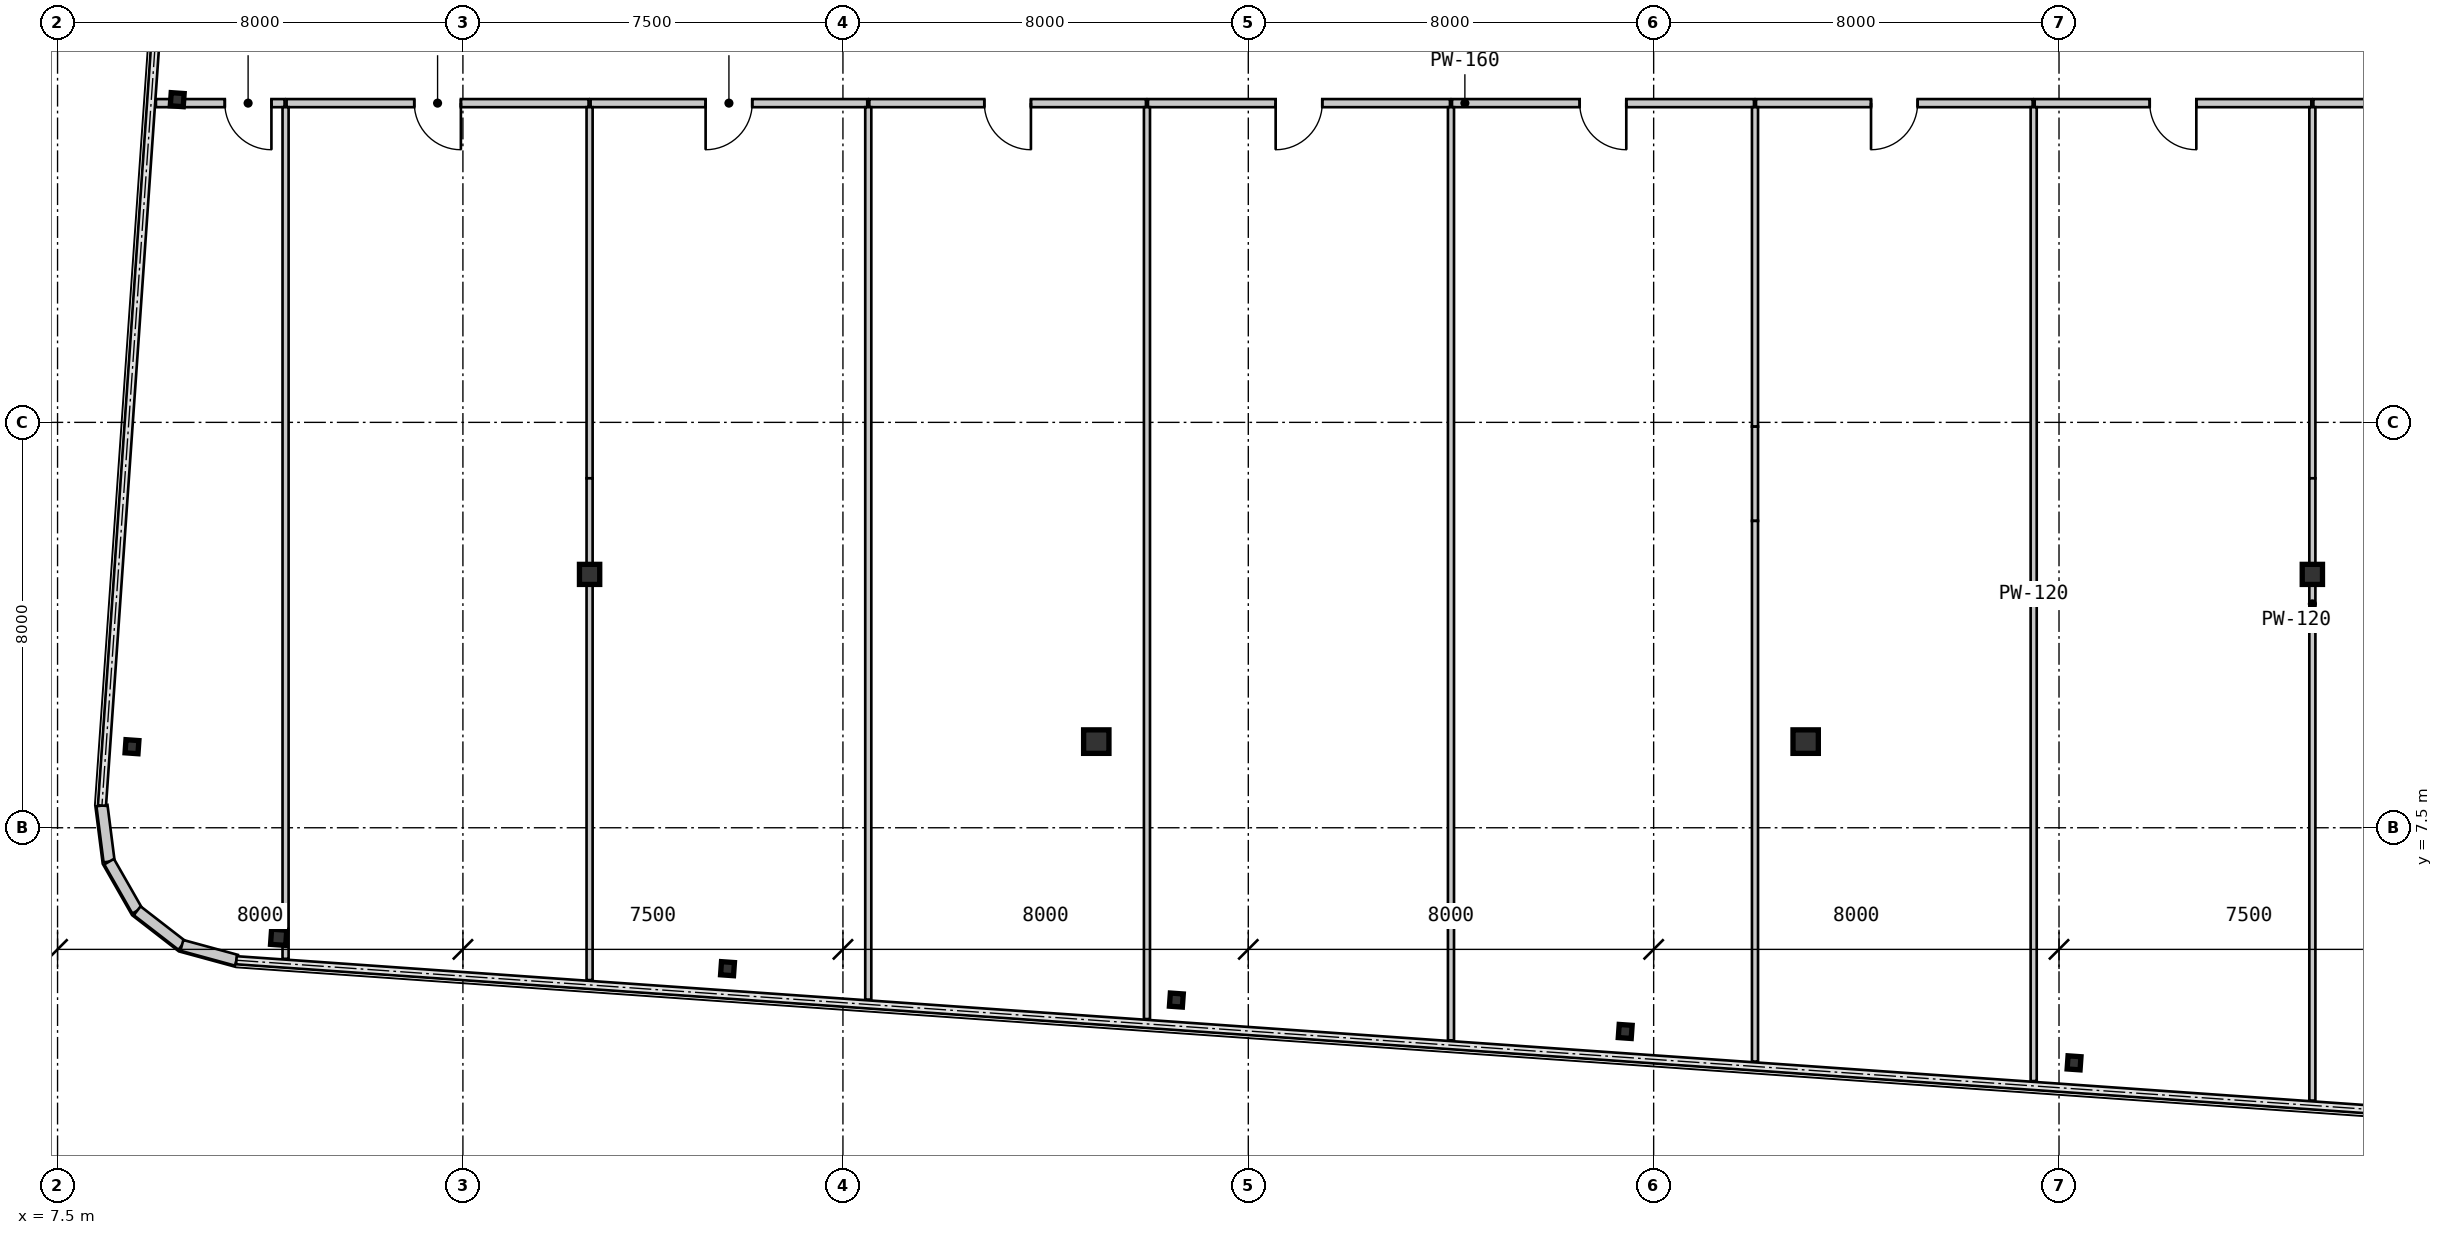
"""IFC4 building model, lengths in metres.
Left out: names, types, materials, properties, quantities, classifications, styles, units other than length and angle.
Written with IfcOpenShell. Run it as: python <this file> out.ifc"""

import sys

from ifc_helpers import new_model, si_unit, direction, frame, frame_2d, origin, origin_2d, place, context, subcontext, project, spatial, rectangle, hollow_rectangle, i_section, extrude, source, transform, mapped, element, fill, save


model = new_model("IFC4")
c1 = context("Model", 3, precision=1e-05, world=origin(), true_north=direction((0.0, 1.0)))
c2 = subcontext(c1, "Body", "Model", "MODEL_VIEW")
j1 = project(units=[si_unit("LENGTHUNIT", "METRE"), si_unit("PLANEANGLEUNIT", "RADIAN")], contexts=[c1])
p1 = place(None, origin())
s1 = spatial("IfcSite", under=j1, at=p1, CompositionType="ELEMENT")
p2 = place(p1, origin())
s2 = spatial("IfcBuilding", under=s1, at=p2, CompositionType="ELEMENT")
p3 = place(p2, frame((0.0, 0.0, 120.4)))
s3 = spatial("IfcBuildingStorey", under=s2, at=p3, CompositionType="ELEMENT", Elevation=120.4)
m1 = source(origin(), c2, "Body", "SweptSolid", [
    extrude(i_section(OverallWidth=0.5, OverallDepth=0.464, WebThickness=0.022, FlangeThickness=0.034, at=origin_2d()), origin(), (0.0, 0.0, 1.0), 3.15),
])
for number, where, z_axis, x_axis in (
    (1, (28.0, 9.2, 0.0), (0.0, 0.0, 1.0), (1.0, 0.0, 0.0)),
    (2, (42.0, 9.2, 0.0), (0.0, 0.0, 1.0), (1.0, 0.0, 0.0)),
):
    element("IfcColumn", number, at=place(p3, frame(where, z_axis=z_axis, x_axis=x_axis)), inside=s3, PredefinedType="COLUMN", context=c2, shape_type="MappedRepresentation", body=[
        mapped(m1, transform((0.0, 0.0, 0.0), scale=1.0)),
    ])
m2 = source(origin(), c2, "Body", "SweptSolid", [
    extrude(i_section(OverallWidth=0.4, OverallDepth=0.396, WebThickness=0.022, FlangeThickness=0.034, at=origin_2d()), origin(), (0.0, 0.0, 1.0), 3.15),
])
for number, where, z_axis, x_axis in (
    (3, (18.0, 12.5, 0.0), (0.0, 0.0, 1.0), (1.0, 0.0, 0.0)),
    (4, (52.0, 12.5, 0.0), (0.0, 0.0, 1.0), (1.0, 0.0, 0.0)),
):
    element("IfcColumn", number, at=place(p3, frame(where, z_axis=z_axis, x_axis=x_axis)), inside=s3, PredefinedType="COLUMN", context=c2, shape_type="MappedRepresentation", body=[
        mapped(m2, transform((0.0, 0.0, 0.0), scale=1.0)),
    ])
m3 = source(origin(), c2, "Body", "SweptSolid", [
    extrude(hollow_rectangle(XDim=0.3, YDim=0.3, WallThickness=0.012, at=origin_2d()), origin(), (0.0, 0.0, 1.0), 3.15),
])
p4 = place(p3, frame((11.864, 5.338, 0.0), z_axis=(0.0, 0.0, 1.0), x_axis=(0.99756405026, -0.069756473744, 0.0)))
e5 = element("IfcColumn", 5, at=p4, inside=s3, PredefinedType="COLUMN", context=c2, shape_type="MappedRepresentation", body=[
    mapped(m3, transform((0.0, 0.0, 0.0), scale=1.0)),
])
m4 = source(origin(), c2, "Body", "SweptSolid", [
    extrude(i_section(OverallWidth=0.256, OverallDepth=0.26, WebThickness=0.01, FlangeThickness=0.017, at=origin_2d()), origin(), (0.0, 0.0, 1.0), 3.15),
])
for number, where, z_axis, x_axis in (
    (6, (20.722, 4.719, 0.0), (0.0, 0.0, 1.0), (0.998, -0.07, 0.0)),
    (7, (29.58, 4.1, 0.0), (0.0, 0.0, 1.0), (0.998, -0.07, 0.0)),
    (8, (38.439, 3.48, 0.0), (0.0, 0.0, 1.0), (0.998, -0.07, 0.0)),
    (9, (47.297, 2.861, 0.0), (0.0, 0.0, 1.0), (0.998, -0.07, 0.0)),
    (10, (8.969, 9.1, 0.0), (0.0, 0.0, 1.0), (0.998, -0.07, 0.0)),
    (11, (9.862, 21.868, 0.0), (0.0, 0.0, 1.0), (0.998, -0.07, 0.0)),
):
    element("IfcColumn", number, at=place(p3, frame(where, z_axis=z_axis, x_axis=x_axis)), inside=s3, PredefinedType="COLUMN", context=c2, shape_type="MappedRepresentation", body=[
        mapped(m4, transform((0.0, 0.0, 0.0), scale=1.0)),
    ])
m5 = source(origin(), c2, "Body", "SweptSolid", [
    extrude(rectangle(XDim=1.116, YDim=0.22, at=frame_2d((0.558, 0.0))), origin(), (0.0, 0.0, 1.0), 2.93),
])
for number, where, z_axis, x_axis in (
    (12, (8.376, 7.938, 0.0), (0.0, 0.0, 1.0), (0.126, -0.992, 0.0)),
    (13, (8.517, 6.831, 0.0), (0.0, 0.0, 1.0), (0.496, -0.868, 0.0)),
    (14, (9.071, 5.862, 0.0), (0.0, 0.0, 1.0), (0.791, -0.612, 0.0)),
    (15, (9.953, 5.179, 0.0), (0.0, 0.0, 1.0), (0.965, -0.263, 0.0)),
):
    element("IfcWall", number, at=place(p3, frame(where, z_axis=z_axis, x_axis=x_axis)), inside=s3, PredefinedType="SOLIDWALL", context=c2, shape_type="MappedRepresentation", body=[
        mapped(m5, transform((0.0, 0.0, 0.0), scale=1.0)),
    ])
m6 = source(origin(), c2, "Body", "SweptSolid", [
    extrude(rectangle(XDim=2.538, YDim=0.16, at=frame_2d((1.269, 0.0))), origin(), (0.0, 0.0, 1.0), 2.93),
])
p5 = place(p3, frame((11.98, 21.8, 0.0), z_axis=(0.0, 0.0, 1.0), x_axis=(-1.0, 0.0, 0.0)))
e16 = element("IfcWall", 16, at=p5, inside=s3, PredefinedType="PARTITIONING", context=c2, shape_type="MappedRepresentation", body=[
    mapped(m6, transform((0.0, 0.0, 0.0), scale=1.0)),
])
m7 = source(origin(), c2, "Body", "SweptSolid", [
    extrude(rectangle(XDim=0.92, YDim=2.1, at=frame_2d((0.46, 1.05))), frame((0.0, 0.09, 0.0), z_axis=(0.0, -1.0, 0.0), x_axis=(1.0, 0.0, 0.0)), (0.0, 0.0, 1.0), 0.18),
])
p6 = place(p5, frame((0.259, 0.0, 0.0)))
e17 = element("IfcOpeningElement", 17, at=p6, cuts=e16, PredefinedType="OPENING", context=c2, shape_type="MappedRepresentation", body=[
    mapped(m7, transform((0.0, 0.0, 0.0), scale=1.0)),
])
m8 = source(origin(), c2, "Body", "SweptSolid", [
    extrude(rectangle(XDim=5.959, YDim=0.16, at=frame_2d((2.98, 0.0))), origin(), (0.0, 0.0, 1.0), 2.93),
])
p7 = place(p3, frame((17.98, 21.8, 0.0), z_axis=(0.0, 0.0, 1.0), x_axis=(-1.0, 0.0, 0.0)))
e18 = element("IfcWall", 18, at=p7, inside=s3, PredefinedType="PARTITIONING", context=c2, shape_type="MappedRepresentation", body=[
    mapped(m8, transform((0.0, 0.0, 0.0), scale=1.0)),
])
p8 = place(p7, frame((2.52, 0.0, 0.0)))
e19 = element("IfcOpeningElement", 19, at=p8, cuts=e18, PredefinedType="OPENING", context=c2, shape_type="MappedRepresentation", body=[
    mapped(m7, transform((0.0, 0.0, 0.0), scale=1.0)),
])
m9 = source(origin(), c2, "Body", "SweptSolid", [
    extrude(rectangle(XDim=5.459, YDim=0.16, at=frame_2d((2.73, 0.0))), origin(), (0.0, 0.0, 1.0), 2.93),
])
p9 = place(p3, frame((23.48, 21.8, 0.0), z_axis=(0.0, 0.0, 1.0), x_axis=(-1.0, 0.0, 0.0)))
e20 = element("IfcWall", 20, at=p9, inside=s3, PredefinedType="PARTITIONING", context=c2, shape_type="MappedRepresentation", body=[
    mapped(m9, transform((0.0, 0.0, 0.0), scale=1.0)),
])
p10 = place(p9, frame((2.27, 0.0, 0.0)))
e21 = element("IfcOpeningElement", 21, at=p10, cuts=e20, PredefinedType="OPENING", context=c2, shape_type="MappedRepresentation", body=[
    mapped(m7, transform((0.0, 0.0, 0.0), scale=1.0)),
])
p11 = place(p3, frame((28.98, 21.8, 0.0), z_axis=(0.0, 0.0, 1.0), x_axis=(-1.0, 0.0, 0.0)))
e22 = element("IfcWall", 22, at=p11, inside=s3, PredefinedType="PARTITIONING", context=c2, shape_type="MappedRepresentation", body=[
    mapped(m9, transform((0.0, 0.0, 0.0), scale=1.0)),
])
p12 = place(p11, frame((2.27, 0.0, 0.0)))
e23 = element("IfcOpeningElement", 23, at=p12, cuts=e22, PredefinedType="OPENING", context=c2, shape_type="MappedRepresentation", body=[
    mapped(m7, transform((0.0, 0.0, 0.0), scale=1.0)),
])
p13 = place(p3, frame((34.98, 21.8, 0.0), z_axis=(0.0, 0.0, 1.0), x_axis=(-1.0, 0.0, 0.0)))
e24 = element("IfcWall", 24, at=p13, inside=s3, PredefinedType="PARTITIONING", context=c2, shape_type="MappedRepresentation", body=[
    mapped(m8, transform((0.0, 0.0, 0.0), scale=1.0)),
])
p14 = place(p13, frame((2.52, 0.0, 0.0)))
e25 = element("IfcOpeningElement", 25, at=p14, cuts=e24, PredefinedType="OPENING", context=c2, shape_type="MappedRepresentation", body=[
    mapped(m7, transform((0.0, 0.0, 0.0), scale=1.0)),
])
p15 = place(p3, frame((40.98, 21.8, 0.0), z_axis=(0.0, 0.0, 1.0), x_axis=(-1.0, 0.0, 0.0)))
e26 = element("IfcWall", 26, at=p15, inside=s3, PredefinedType="PARTITIONING", context=c2, shape_type="MappedRepresentation", body=[
    mapped(m8, transform((0.0, 0.0, 0.0), scale=1.0)),
])
p16 = place(p15, frame((2.52, 0.0, 0.0)))
e27 = element("IfcOpeningElement", 27, at=p16, cuts=e26, PredefinedType="OPENING", context=c2, shape_type="MappedRepresentation", body=[
    mapped(m7, transform((0.0, 0.0, 0.0), scale=1.0)),
])
p17 = place(p3, frame((46.48, 21.8, 0.0), z_axis=(0.0, 0.0, 1.0), x_axis=(-1.0, 0.0, 0.0)))
e28 = element("IfcWall", 28, at=p17, inside=s3, PredefinedType="PARTITIONING", context=c2, shape_type="MappedRepresentation", body=[
    mapped(m9, transform((0.0, 0.0, 0.0), scale=1.0)),
])
p18 = place(p17, frame((2.27, 0.0, 0.0)))
e29 = element("IfcOpeningElement", 29, at=p18, cuts=e28, PredefinedType="OPENING", context=c2, shape_type="MappedRepresentation", body=[
    mapped(m7, transform((0.0, 0.0, 0.0), scale=1.0)),
])
p19 = place(p3, frame((51.98, 21.8, 0.0), z_axis=(0.0, 0.0, 1.0), x_axis=(-1.0, 0.0, 0.0)))
e30 = element("IfcWall", 30, at=p19, inside=s3, PredefinedType="PARTITIONING", context=c2, shape_type="MappedRepresentation", body=[
    mapped(m9, transform((0.0, 0.0, 0.0), scale=1.0)),
])
p20 = place(p19, frame((2.27, 0.0, 0.0)))
e31 = element("IfcOpeningElement", 31, at=p20, cuts=e30, PredefinedType="OPENING", context=c2, shape_type="MappedRepresentation", body=[
    mapped(m7, transform((0.0, 0.0, 0.0), scale=1.0)),
])
p21 = place(p3, frame((57.98, 21.8, 0.0), z_axis=(0.0, 0.0, 1.0), x_axis=(-1.0, 0.0, 0.0)))
e32 = element("IfcWall", 32, at=p21, inside=s3, PredefinedType="PARTITIONING", context=c2, shape_type="MappedRepresentation", body=[
    mapped(m8, transform((0.0, 0.0, 0.0), scale=1.0)),
])
p22 = place(p21, frame((2.52, 0.0, 0.0)))
e33 = element("IfcOpeningElement", 33, at=p22, cuts=e32, PredefinedType="OPENING", context=c2, shape_type="MappedRepresentation", body=[
    mapped(m7, transform((0.0, 0.0, 0.0), scale=1.0)),
])
m10 = source(origin(), c2, "Body", "SweptSolid", [
    extrude(rectangle(XDim=16.807, YDim=0.12, at=frame_2d((8.403, 0.0))), origin(), (0.0, 0.0, 1.0), 2.93),
])
p23 = place(p3, frame((12.0, 21.72, 0.0), z_axis=(0.0, 0.0, 1.0), x_axis=(0.0, -1.0, 0.0)))
e34 = element("IfcWall", 34, at=p23, inside=s3, PredefinedType="PARTITIONING", context=c2, shape_type="MappedRepresentation", body=[
    mapped(m10, transform((0.0, 0.0, 0.0), scale=1.0)),
])
m11 = source(origin(), c2, "Body", "SweptSolid", [
    extrude(rectangle(XDim=7.324, YDim=0.12, at=frame_2d((3.662, 0.0))), origin(), (0.0, 0.0, 1.0), 2.93),
])
p24 = place(p3, frame((18.0, 21.72, 0.0), z_axis=(0.0, 0.0, 1.0), x_axis=(0.0, -1.0, 0.0)))
e35 = element("IfcWall", 35, at=p24, inside=s3, PredefinedType="PARTITIONING", context=c2, shape_type="MappedRepresentation", body=[
    mapped(m11, transform((0.0, 0.0, 0.0), scale=1.0)),
])
m12 = source(origin(), c2, "Body", "SweptSolid", [
    extrude(rectangle(XDim=1.901, YDim=0.12, at=frame_2d((0.951, 0.0))), origin(), (0.0, 0.0, 1.0), 2.397),
])
p25 = place(p3, frame((18.0, 14.396, 0.0), z_axis=(0.0, 0.0, 1.0), x_axis=(0.0, -1.0, 0.0)))
e36 = element("IfcWall", 36, at=p25, inside=s3, PredefinedType="PARTITIONING", context=c2, shape_type="MappedRepresentation", body=[
    mapped(m12, transform((0.0, 0.0, 0.0), scale=1.0)),
])
m13 = source(origin(), c2, "Body", "SweptSolid", [
    extrude(rectangle(XDim=8.001, YDim=0.12, at=frame_2d((4.0, 0.0))), origin(), (0.0, 0.0, 1.0), 2.93),
])
p26 = place(p3, frame((18.0, 12.495, 0.0), z_axis=(0.0, 0.0, 1.0), x_axis=(0.0, -1.0, 0.0)))
e37 = element("IfcWall", 37, at=p26, inside=s3, PredefinedType="PARTITIONING", context=c2, shape_type="MappedRepresentation", body=[
    mapped(m13, transform((0.0, 0.0, 0.0), scale=1.0)),
])
m14 = source(origin(), c2, "Body", "SweptSolid", [
    extrude(rectangle(XDim=17.611, YDim=0.12, at=frame_2d((8.805, 0.0))), origin(), (0.0, 0.0, 1.0), 2.93),
])
p27 = place(p3, frame((23.5, 21.72, 0.0), z_axis=(0.0, 0.0, 1.0), x_axis=(0.0, -1.0, 0.0)))
e38 = element("IfcWall", 38, at=p27, inside=s3, PredefinedType="PARTITIONING", context=c2, shape_type="MappedRepresentation", body=[
    mapped(m14, transform((0.0, 0.0, 0.0), scale=1.0)),
])
m15 = source(origin(), c2, "Body", "SweptSolid", [
    extrude(rectangle(XDim=17.995, YDim=0.12, at=frame_2d((8.998, 0.0))), origin(), (0.0, 0.0, 1.0), 2.93),
])
p28 = place(p3, frame((29.0, 21.72, 0.0), z_axis=(0.0, 0.0, 1.0), x_axis=(0.0, -1.0, 0.0)))
e39 = element("IfcWall", 39, at=p28, inside=s3, PredefinedType="PARTITIONING", context=c2, shape_type="MappedRepresentation", body=[
    mapped(m15, transform((0.0, 0.0, 0.0), scale=1.0)),
])
m16 = source(origin(), c2, "Body", "SweptSolid", [
    extrude(rectangle(XDim=18.415, YDim=0.12, at=frame_2d((9.208, 0.0))), origin(), (0.0, 0.0, 1.0), 2.93),
])
p29 = place(p3, frame((35.0, 21.72, 0.0), z_axis=(0.0, 0.0, 1.0), x_axis=(0.0, -1.0, 0.0)))
e40 = element("IfcWall", 40, at=p29, inside=s3, PredefinedType="PARTITIONING", context=c2, shape_type="MappedRepresentation", body=[
    mapped(m16, transform((0.0, 0.0, 0.0), scale=1.0)),
])
m17 = source(origin(), c2, "Body", "SweptSolid", [
    extrude(rectangle(XDim=6.304, YDim=0.12, at=frame_2d((3.152, 0.0))), origin(), (0.0, 0.0, 1.0), 2.93),
])
p30 = place(p3, frame((41.0, 21.72, 0.0), z_axis=(0.0, 0.0, 1.0), x_axis=(0.0, -1.0, 0.0)))
e41 = element("IfcWall", 41, at=p30, inside=s3, PredefinedType="PARTITIONING", context=c2, shape_type="MappedRepresentation", body=[
    mapped(m17, transform((0.0, 0.0, 0.0), scale=1.0)),
])
m18 = source(origin(), c2, "Body", "SweptSolid", [
    extrude(rectangle(XDim=1.861, YDim=0.12, at=frame_2d((0.93, 0.0))), origin(), (0.0, 0.0, 1.0), 2.328),
])
p31 = place(p3, frame((41.0, 15.416, 0.0), z_axis=(0.0, 0.0, 1.0), x_axis=(0.0, -1.0, 0.0)))
e42 = element("IfcWall", 42, at=p31, inside=s3, PredefinedType="PARTITIONING", context=c2, shape_type="MappedRepresentation", body=[
    mapped(m18, transform((0.0, 0.0, 0.0), scale=1.0)),
])
m19 = source(origin(), c2, "Body", "SweptSolid", [
    extrude(rectangle(XDim=10.67, YDim=0.12, at=frame_2d((5.335, 0.0))), origin(), (0.0, 0.0, 1.0), 2.93),
])
p32 = place(p3, frame((41.0, 13.555, 0.0), z_axis=(0.0, 0.0, 1.0), x_axis=(0.0, -1.0, 0.0)))
e43 = element("IfcWall", 43, at=p32, inside=s3, PredefinedType="PARTITIONING", context=c2, shape_type="MappedRepresentation", body=[
    mapped(m19, transform((0.0, 0.0, 0.0), scale=1.0)),
])
m20 = source(origin(), c2, "Body", "SweptSolid", [
    extrude(rectangle(XDim=19.219, YDim=0.12, at=frame_2d((9.609, 0.0))), origin(), (0.0, 0.0, 1.0), 2.93),
])
p33 = place(p3, frame((46.5, 21.72, 0.0), z_axis=(0.0, 0.0, 1.0), x_axis=(0.0, -1.0, 0.0)))
e44 = element("IfcWall", 44, at=p33, inside=s3, PredefinedType="PARTITIONING", context=c2, shape_type="MappedRepresentation", body=[
    mapped(m20, transform((0.0, 0.0, 0.0), scale=1.0)),
])
p34 = place(p3, frame((52.0, 21.72, 0.0), z_axis=(0.0, 0.0, 1.0), x_axis=(0.0, -1.0, 0.0)))
e45 = element("IfcWall", 45, at=p34, inside=s3, PredefinedType="PARTITIONING", context=c2, shape_type="MappedRepresentation", body=[
    mapped(m11, transform((0.0, 0.0, 0.0), scale=1.0)),
])
p35 = place(p3, frame((52.0, 14.396, 0.0), z_axis=(0.0, 0.0, 1.0), x_axis=(0.0, -1.0, 0.0)))
e46 = element("IfcWall", 46, at=p35, inside=s3, PredefinedType="PARTITIONING", context=c2, shape_type="MappedRepresentation", body=[
    mapped(m12, transform((0.0, 0.0, 0.0), scale=1.0)),
])
m21 = source(origin(), c2, "Body", "SweptSolid", [
    extrude(rectangle(XDim=10.378, YDim=0.12, at=frame_2d((5.189, 0.0))), origin(), (0.0, 0.0, 1.0), 2.93),
])
p36 = place(p3, frame((52.0, 12.495, 0.0), z_axis=(0.0, 0.0, 1.0), x_axis=(0.0, -1.0, 0.0)))
e47 = element("IfcWall", 47, at=p36, inside=s3, PredefinedType="PARTITIONING", context=c2, shape_type="MappedRepresentation", body=[
    mapped(m21, transform((0.0, 0.0, 0.0), scale=1.0)),
])
m22 = source(origin(), c2, "Body", "SweptSolid", [
    extrude(rectangle(XDim=0.92, YDim=2.1, at=frame_2d((0.46, 1.05))), frame((0.0, 0.025, 0.0), z_axis=(0.0, -1.0, 0.0), x_axis=(1.0, 0.0, 0.0)), (0.0, 0.0, 1.0), 0.05),
])
p37 = place(p6, origin())
e48 = element("IfcDoor", 48, at=p37, inside=s3, OperationType="SINGLE_SWING_LEFT", PredefinedType="DOOR", context=c2, shape_type="MappedRepresentation", body=[
    mapped(m22, transform((0.0, 0.0, 0.0), scale=1.0)),
])
fill(e17, e48)
p38 = place(p8, origin())
e49 = element("IfcDoor", 49, at=p38, inside=s3, OperationType="SINGLE_SWING_LEFT", PredefinedType="DOOR", context=c2, shape_type="MappedRepresentation", body=[
    mapped(m22, transform((0.0, 0.0, 0.0), scale=1.0)),
])
fill(e19, e49)
p39 = place(p10, origin())
e50 = element("IfcDoor", 50, at=p39, inside=s3, OperationType="SINGLE_SWING_RIGHT", PredefinedType="DOOR", context=c2, shape_type="MappedRepresentation", body=[
    mapped(m22, transform((0.0, 0.0, 0.0), scale=1.0)),
])
fill(e21, e50)
p40 = place(p12, origin())
e51 = element("IfcDoor", 51, at=p40, inside=s3, OperationType="SINGLE_SWING_LEFT", PredefinedType="DOOR", context=c2, shape_type="MappedRepresentation", body=[
    mapped(m22, transform((0.0, 0.0, 0.0), scale=1.0)),
])
fill(e23, e51)
p41 = place(p14, origin())
e52 = element("IfcDoor", 52, at=p41, inside=s3, OperationType="SINGLE_SWING_RIGHT", PredefinedType="DOOR", context=c2, shape_type="MappedRepresentation", body=[
    mapped(m22, transform((0.0, 0.0, 0.0), scale=1.0)),
])
fill(e25, e52)
p42 = place(p16, origin())
e53 = element("IfcDoor", 53, at=p42, inside=s3, OperationType="SINGLE_SWING_LEFT", PredefinedType="DOOR", context=c2, shape_type="MappedRepresentation", body=[
    mapped(m22, transform((0.0, 0.0, 0.0), scale=1.0)),
])
fill(e27, e53)
p43 = place(p18, origin())
e54 = element("IfcDoor", 54, at=p43, inside=s3, OperationType="SINGLE_SWING_RIGHT", PredefinedType="DOOR", context=c2, shape_type="MappedRepresentation", body=[
    mapped(m22, transform((0.0, 0.0, 0.0), scale=1.0)),
])
fill(e29, e54)
p44 = place(p20, origin())
e55 = element("IfcDoor", 55, at=p44, inside=s3, OperationType="SINGLE_SWING_LEFT", PredefinedType="DOOR", context=c2, shape_type="MappedRepresentation", body=[
    mapped(m22, transform((0.0, 0.0, 0.0), scale=1.0)),
])
fill(e31, e55)
save(model, sys.argv[1])
